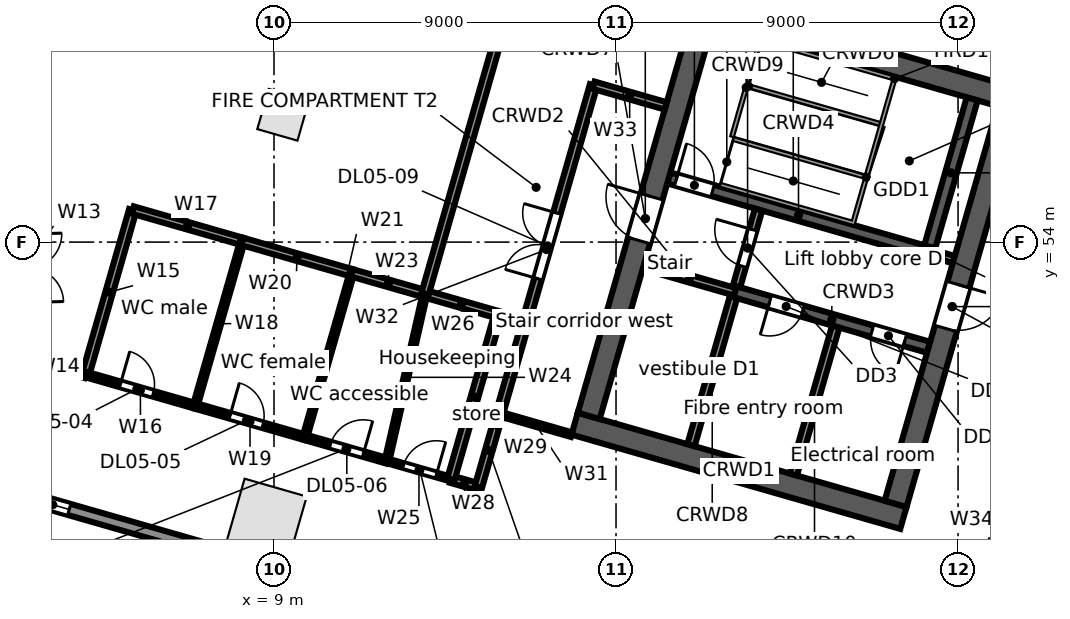
"""IFC4 building model, lengths in metres.
Left out: names, types, materials, properties, quantities, classifications, styles, units other than length and angle.
Written with IfcOpenShell. Run it as: python <this file> out.ifc"""

import sys

from ifc_helpers import new_model, si_unit, direction, frame, frame_2d, origin, origin_2d, place, context, subcontext, project, spatial, rectangle, extrude, element, fill, save


model = new_model("IFC4")
c1 = context("Model", 3, precision=1e-05, world=origin(), true_north=direction((0.0, 1.0)))
c2 = subcontext(c1, "Body", "Model", "MODEL_VIEW")
j1 = project(units=[si_unit("LENGTHUNIT", "METRE"), si_unit("PLANEANGLEUNIT", "RADIAN")], contexts=[c1])
p1 = place(None, origin())
s1 = spatial("IfcSite", under=j1, at=p1, CompositionType="ELEMENT")
p2 = place(p1, origin())
s2 = spatial("IfcBuilding", under=s1, at=p2, CompositionType="ELEMENT")
p3 = place(p2, frame((0.0, 0.0, 36.5)))
s3 = spatial("IfcBuildingStorey", under=s2, at=p3, CompositionType="ELEMENT", Elevation=36.5)
p4 = place(p3, frame((8.81, 46.722, 0.0), z_axis=(0.0, 0.0, 1.0), x_axis=(0.961261695938, -0.275637355817, 0.0)))
e1 = element("IfcColumn", 1, at=p4, inside=s3, PredefinedType="COLUMN", context=c2, shape_type="SweptSolid", body=[
    extrude(rectangle(XDim=1.7, YDim=1.7, at=origin_2d()), origin(), (0.0, 0.0, 1.0), 5.0),
])
p5 = place(p3, frame((9.241, 57.35, 0.0), z_axis=(0.0, 0.0, 1.0), x_axis=(0.961261695938, -0.275637355817, 0.0)))
e2 = element("IfcColumn", 2, at=p5, inside=s3, PredefinedType="COLUMN", context=c2, shape_type="SweptSolid", body=[
    extrude(rectangle(XDim=1.1, YDim=1.1, at=origin_2d()), origin(), (0.0, 0.0, 1.0), 5.0),
])
p6 = place(p3, frame((25.398, 40.717, 0.0), z_axis=(0.0, 0.0, 1.0), x_axis=(-0.961262423262, 0.275634819324, 0.0)))
e3 = element("IfcWall", 3, at=p6, inside=s3, PredefinedType="STANDARD", context=c2, shape_type="SweptSolid", body=[
    extrude(rectangle(XDim=26.359, YDim=0.3, at=frame_2d((13.179, 0.0))), origin(), (0.0, 0.0, 1.0), 4.68),
])
p7 = place(p6, frame((22.664, 0.0, 0.6)))
e4 = element("IfcOpeningElement", 4, at=p7, cuts=e3, PredefinedType="OPENING", context=c2, shape_type="SweptSolid", body=[
    extrude(rectangle(XDim=0.9, YDim=3.2, at=frame_2d((0.45, 1.6))), frame((0.0, 0.16, 0.0), z_axis=(0.0, -1.0, 0.0), x_axis=(1.0, 0.0, 0.0)), (0.0, 0.0, 1.0), 0.32),
])
p8 = place(p6, frame((13.844, 0.0, 0.6)))
e5 = element("IfcOpeningElement", 5, at=p8, cuts=e3, PredefinedType="OPENING", context=c2, shape_type="SweptSolid", body=[
    extrude(rectangle(XDim=0.9, YDim=3.2, at=frame_2d((0.45, 1.6))), frame((0.0, 0.16, 0.0), z_axis=(0.0, -1.0, 0.0), x_axis=(1.0, 0.0, 0.0)), (0.0, 0.0, 1.0), 0.32),
])
p9 = place(p6, frame((5.023, 0.0, 0.6)))
e6 = element("IfcOpeningElement", 6, at=p9, cuts=e3, PredefinedType="OPENING", context=c2, shape_type="SweptSolid", body=[
    extrude(rectangle(XDim=0.9, YDim=3.2, at=frame_2d((0.45, 1.6))), frame((0.0, 0.16, 0.0), z_axis=(0.0, -1.0, 0.0), x_axis=(1.0, 0.0, 0.0)), (0.0, 0.0, 1.0), 0.32),
])
p10 = place(p3, frame((16.911, 49.221, 0.0), z_axis=(0.0, 0.0, 1.0), x_axis=(0.96126248289, -0.275634611374, 0.0)))
e7 = element("IfcWall", 7, at=p10, inside=s3, PredefinedType="SOLIDWALL", context=c2, shape_type="SweptSolid", body=[
    extrude(rectangle(XDim=9.0, YDim=0.6, at=frame_2d((4.5, 0.0))), origin(), (0.0, 0.0, 1.0), 4.68),
])
p11 = place(p3, frame((18.728, 53.382, 0.0), z_axis=(0.0, 0.0, 1.0), x_axis=(0.961247070632, -0.275688355216, 0.0)))
e8 = element("IfcWall", 8, at=p11, inside=s3, PredefinedType="SOLIDWALL", context=c2, shape_type="SweptSolid", body=[
    extrude(rectangle(XDim=2.5, YDim=0.2, at=frame_2d((1.25, 0.0))), origin(), (0.0, 0.0, 1.0), 4.68),
])
p12 = place(p3, frame((21.131, 52.692, 0.0), z_axis=(0.0, 0.0, 1.0), x_axis=(0.961271492568, -0.275603188616, 0.0)))
e9 = element("IfcWall", 9, at=p12, inside=s3, PredefinedType="SOLIDWALL", context=c2, shape_type="SweptSolid", body=[
    extrude(rectangle(XDim=5.3, YDim=0.3, at=frame_2d((2.65, 0.0))), origin(), (0.0, 0.0, 1.0), 4.68),
])
p13 = place(p12, frame((0.95, 0.0, 0.0)))
e10 = element("IfcOpeningElement", 10, at=p13, cuts=e9, PredefinedType="OPENING", context=c2, shape_type="SweptSolid", body=[
    extrude(rectangle(XDim=0.9, YDim=2.1, at=frame_2d((0.45, 1.05))), frame((0.0, 0.16, 0.0), z_axis=(0.0, -1.0, 0.0), x_axis=(1.0, 0.0, 0.0)), (0.0, 0.0, 1.0), 0.32),
])
p14 = place(p12, frame((3.75, 0.0, 0.0)))
e11 = element("IfcOpeningElement", 11, at=p14, cuts=e9, PredefinedType="OPENING", context=c2, shape_type="SweptSolid", body=[
    extrude(rectangle(XDim=0.9, YDim=2.1, at=frame_2d((0.45, 1.05))), frame((0.0, 0.16, 0.0), z_axis=(0.0, -1.0, 0.0), x_axis=(1.0, 0.0, 0.0)), (0.0, 0.0, 1.0), 0.32),
])
p15 = place(p3, frame((19.389, 55.689, 0.0), z_axis=(0.0, 0.0, 1.0), x_axis=(0.961261397636, -0.275638396117, 0.0)))
e12 = element("IfcWall", 12, at=p15, inside=s3, PredefinedType="SOLIDWALL", context=c2, shape_type="SweptSolid", body=[
    extrude(rectangle(XDim=7.1, YDim=0.3, at=frame_2d((3.55, 0.0))), origin(), (0.0, 0.0, 1.0), 4.68),
])
p16 = place(p15, frame((0.2, 0.0, 0.0)))
e13 = element("IfcOpeningElement", 13, at=p16, cuts=e12, PredefinedType="OPENING", context=c2, shape_type="SweptSolid", body=[
    extrude(rectangle(XDim=1.0, YDim=2.1, at=frame_2d((0.5, 1.05))), frame((0.0, 0.16, 0.0), z_axis=(0.0, -1.0, 0.0), x_axis=(1.0, 0.0, 0.0)), (0.0, 0.0, 1.0), 0.32),
])
p17 = place(p3, frame((26.214, 53.732, 0.0), z_axis=(0.0, 0.0, 1.0), x_axis=(0.96122076476, -0.27578005982, 0.0)))
e14 = element("IfcWall", 14, at=p17, inside=s3, PredefinedType="SOLIDWALL", context=c2, shape_type="SweptSolid", body=[
    extrude(rectangle(XDim=0.7, YDim=0.2, at=frame_2d((0.35, 0.0))), origin(), (0.0, 0.0, 1.0), 4.68),
])
p18 = place(p3, frame((20.053, 60.18, 0.0), z_axis=(0.0, 0.0, 1.0), x_axis=(0.96126248289, -0.275634611374, 0.0)))
e15 = element("IfcWall", 15, at=p18, inside=s3, PredefinedType="SOLIDWALL", context=c2, shape_type="SweptSolid", body=[
    extrude(rectangle(XDim=9.0, YDim=0.6, at=frame_2d((4.5, 0.0))), origin(), (0.0, 0.0, 1.0), 4.68),
])
p19 = place(p3, frame((17.282, 49.427, 0.0), z_axis=(0.0, 0.0, 1.0), x_axis=(0.275631631629, 0.961263337304, 0.0)))
e16 = element("IfcWall", 16, at=p19, inside=s3, PredefinedType="SOLIDWALL", context=c2, shape_type="SweptSolid", body=[
    extrude(rectangle(XDim=10.8, YDim=0.6, at=frame_2d((5.4, 0.0))), origin(), (0.0, 0.0, 1.0), 4.68),
])
p20 = place(p19, frame((4.8, 0.0, 0.0)))
e17 = element("IfcOpeningElement", 17, at=p20, cuts=e16, PredefinedType="OPENING", context=c2, shape_type="SweptSolid", body=[
    extrude(rectangle(XDim=1.2, YDim=2.1, at=frame_2d((0.6, 1.05))), frame((0.0, 0.31, 0.0), z_axis=(0.0, -1.0, 0.0), x_axis=(1.0, 0.0, 0.0)), (0.0, 0.0, 1.0), 0.62),
])
p21 = place(p3, frame((19.973, 48.655, 0.0), z_axis=(0.0, 0.0, 1.0), x_axis=(0.275668441653, 0.961252781674, 0.0)))
e18 = element("IfcWall", 18, at=p21, inside=s3, PredefinedType="SOLIDWALL", context=c2, shape_type="SweptSolid", body=[
    extrude(rectangle(XDim=4.05, YDim=0.2, at=frame_2d((2.025, 0.0))), origin(), (0.0, 0.0, 1.0), 4.68),
])
p22 = place(p3, frame((21.172, 52.837, 0.0), z_axis=(0.0, 0.0, 1.0), x_axis=(0.275657676022, 0.961255868981, 0.0)))
e19 = element("IfcWall", 19, at=p22, inside=s3, PredefinedType="PARTITIONING", context=c2, shape_type="SweptSolid", body=[
    extrude(rectangle(XDim=2.1, YDim=0.2, at=frame_2d((1.05, 0.0))), origin(), (0.0, 0.0, 1.0), 4.68),
])
p23 = place(p22, frame((0.55, 0.0, 0.0)))
e20 = element("IfcOpeningElement", 20, at=p23, cuts=e19, PredefinedType="OPENING", context=c2, shape_type="SweptSolid", body=[
    extrude(rectangle(XDim=1.0, YDim=2.1, at=frame_2d((0.5, 1.05))), frame((0.0, 0.11, 0.0), z_axis=(0.0, -1.0, 0.0), x_axis=(1.0, 0.0, 0.0)), (0.0, 0.0, 1.0), 0.22),
])
p24 = place(p3, frame((22.665, 47.883, 0.0), z_axis=(0.0, 0.0, 1.0), x_axis=(0.275596769212, 0.961273333033, 0.0)))
e21 = element("IfcWall", 21, at=p24, inside=s3, PredefinedType="PARTITIONING", context=c2, shape_type="SweptSolid", body=[
    extrude(rectangle(XDim=4.05, YDim=0.2, at=frame_2d((2.025, 0.0))), origin(), (0.0, 0.0, 1.0), 4.68),
])
p25 = place(p3, frame((26.256, 53.876, 0.0), z_axis=(0.0, 0.0, 1.0), x_axis=(0.275612739511, 0.961268754209, 0.0)))
e22 = element("IfcWall", 22, at=p25, inside=s3, PredefinedType="SOLIDWALL", context=c2, shape_type="SweptSolid", body=[
    extrude(rectangle(XDim=4.05, YDim=0.3, at=frame_2d((2.025, 0.0))), origin(), (0.0, 0.0, 1.0), 4.68),
])
p26 = place(p3, frame((25.356, 47.112, 0.0), z_axis=(0.0, 0.0, 1.0), x_axis=(0.275631631629, 0.961263337304, 0.0)))
e23 = element("IfcWall", 23, at=p26, inside=s3, PredefinedType="SOLIDWALL", context=c2, shape_type="SweptSolid", body=[
    extrude(rectangle(XDim=10.8, YDim=0.6, at=frame_2d((5.4, 0.0))), origin(), (0.0, 0.0, 1.0), 4.68),
])
p27 = place(p26, frame((4.8, 0.0, 0.0)))
e24 = element("IfcOpeningElement", 24, at=p27, cuts=e23, PredefinedType="OPENING", context=c2, shape_type="SweptSolid", body=[
    extrude(rectangle(XDim=1.2, YDim=2.1, at=frame_2d((0.6, 1.05))), frame((0.0, 0.31, 0.0), z_axis=(0.0, -1.0, 0.0), x_axis=(1.0, 0.0, 0.0)), (0.0, 0.0, 1.0), 0.62),
])
p28 = place(p3, frame((2.601, 50.932, 0.0), z_axis=(0.0, 0.0, 1.0), x_axis=(0.961197773994, -0.27586018065, 0.0)))
e25 = element("IfcWall", 25, at=p28, inside=s3, PredefinedType="PARTITIONING", context=c2, shape_type="SweptSolid", body=[
    extrude(rectangle(XDim=1.5, YDim=0.2, at=frame_2d((0.75, 0.0))), origin(), (0.0, 0.0, 1.0), 4.68),
])
p29 = place(p3, frame((4.043, 50.518, 0.0), z_axis=(0.0, 0.0, 1.0), x_axis=(0.275745553681, 0.96123066411, 0.0)))
e26 = element("IfcWall", 26, at=p29, inside=s3, PredefinedType="PARTITIONING", context=c2, shape_type="SweptSolid", body=[
    extrude(rectangle(XDim=4.5, YDim=0.2, at=frame_2d((2.25, 0.0))), origin(), (0.0, 0.0, 1.0), 4.68),
])
p30 = place(p3, frame((4.043, 50.518, 0.0), z_axis=(0.0, 0.0, 1.0), x_axis=(0.961247103494, -0.275688240636, 0.0)))
e27 = element("IfcWall", 27, at=p30, inside=s3, PredefinedType="PARTITIONING", context=c2, shape_type="SweptSolid", body=[
    extrude(rectangle(XDim=3.0, YDim=0.15, at=frame_2d((1.5, 0.0))), origin(), (0.0, 0.0, 1.0), 4.68),
])
p31 = place(p30, frame((0.95, 0.0, 0.0)))
e28 = element("IfcOpeningElement", 28, at=p31, cuts=e27, PredefinedType="OPENING", context=c2, shape_type="SweptSolid", body=[
    extrude(rectangle(XDim=0.9, YDim=2.1, at=frame_2d((0.45, 1.05))), frame((0.0, 0.085, 0.0), z_axis=(0.0, -1.0, 0.0), x_axis=(1.0, 0.0, 0.0)), (0.0, 0.0, 1.0), 0.17),
])
p32 = place(p3, frame((5.284, 54.844, 0.0), z_axis=(0.0, 0.0, 1.0), x_axis=(0.961243927922, -0.275699312717, 0.0)))
e29 = element("IfcWall", 29, at=p32, inside=s3, PredefinedType="PARTITIONING", context=c2, shape_type="SweptSolid", body=[
    extrude(rectangle(XDim=2.999, YDim=0.2, at=frame_2d((1.5, 0.0))), origin(), (0.0, 0.0, 1.0), 4.68),
])
p33 = place(p3, frame((6.927, 49.691, 0.0), z_axis=(0.0, 0.0, 1.0), x_axis=(0.275530671241, 0.961292280841, 0.0)))
e30 = element("IfcWall", 30, at=p33, inside=s3, PredefinedType="PARTITIONING", context=c2, shape_type="SweptSolid", body=[
    extrude(rectangle(XDim=4.5, YDim=0.125, at=frame_2d((2.25, 0.0))), origin(), (0.0, 0.0, 1.0), 4.68),
])
p34 = place(p3, frame((6.927, 49.691, 0.0), z_axis=(0.0, 0.0, 1.0), x_axis=(0.961268664977, -0.27561305073, 0.0)))
e31 = element("IfcWall", 31, at=p34, inside=s3, PredefinedType="PARTITIONING", context=c2, shape_type="SweptSolid", body=[
    extrude(rectangle(XDim=3.0, YDim=0.15, at=frame_2d((1.5, 0.0))), origin(), (0.0, 0.0, 1.0), 3.742),
])
p35 = place(p34, frame((0.95, 0.0, 0.0)))
e32 = element("IfcOpeningElement", 32, at=p35, cuts=e31, PredefinedType="OPENING", context=c2, shape_type="SweptSolid", body=[
    extrude(rectangle(XDim=0.9, YDim=2.1, at=frame_2d((0.45, 1.05))), frame((0.0, 0.085, 0.0), z_axis=(0.0, -1.0, 0.0), x_axis=(1.0, 0.0, 0.0)), (0.0, 0.0, 1.0), 0.17),
])
p36 = place(p3, frame((8.167, 54.017, 0.0), z_axis=(0.0, 0.0, 1.0), x_axis=(0.961247103494, -0.275688240636, 0.0)))
e33 = element("IfcWall", 33, at=p36, inside=s3, PredefinedType="PARTITIONING", context=c2, shape_type="SweptSolid", body=[
    extrude(rectangle(XDim=3.0, YDim=0.2, at=frame_2d((1.5, 0.0))), origin(), (0.0, 0.0, 1.0), 3.742),
])
p37 = place(p3, frame((9.811, 48.864, 0.0), z_axis=(0.0, 0.0, 1.0), x_axis=(0.275545040649, 0.96128816209, 0.0)))
e34 = element("IfcWall", 34, at=p37, inside=s3, PredefinedType="PARTITIONING", context=c2, shape_type="SweptSolid", body=[
    extrude(rectangle(XDim=4.5, YDim=0.125, at=frame_2d((2.25, 0.0))), origin(), (0.0, 0.0, 1.0), 4.68),
])
p38 = place(p3, frame((9.811, 48.864, 0.0), z_axis=(0.0, 0.0, 1.0), x_axis=(0.961236680145, -0.275724581318, 0.0)))
e35 = element("IfcWall", 35, at=p38, inside=s3, PredefinedType="PARTITIONING", context=c2, shape_type="SweptSolid", body=[
    extrude(rectangle(XDim=2.249, YDim=0.15, at=frame_2d((1.125, 0.0))), origin(), (0.0, 0.0, 1.0), 4.68),
])
p39 = place(p38, frame((0.7, 0.0, 0.0)))
e36 = element("IfcOpeningElement", 36, at=p39, cuts=e35, PredefinedType="OPENING", context=c2, shape_type="SweptSolid", body=[
    extrude(rectangle(XDim=0.9, YDim=2.1, at=frame_2d((0.45, 1.05))), frame((0.0, 0.085, 0.0), z_axis=(0.0, -1.0, 0.0), x_axis=(1.0, 0.0, 0.0)), (0.0, 0.0, 1.0), 0.17),
])
p40 = place(p3, frame((11.051, 53.19, 0.0), z_axis=(0.0, 0.0, 1.0), x_axis=(0.961316434736, -0.275446387355, 0.0)))
e37 = element("IfcWall", 37, at=p40, inside=s3, PredefinedType="PARTITIONING", context=c2, shape_type="SweptSolid", body=[
    extrude(rectangle(XDim=2.0, YDim=0.2, at=frame_2d((1.0, 0.0))), origin(), (0.0, 0.0, 1.0), 4.68),
])
p41 = place(p3, frame((11.973, 48.244, 0.0), z_axis=(0.0, 0.0, 1.0), x_axis=(0.222117362571, 0.975019936845, 0.0)))
e38 = element("IfcWall", 38, at=p41, inside=s3, PredefinedType="PARTITIONING", context=c2, shape_type="SweptSolid", body=[
    extrude(rectangle(XDim=4.508, YDim=0.125, at=frame_2d((2.254, 0.0))), origin(), (0.0, 0.0, 1.0), 4.68),
])
p42 = place(p3, frame((11.973, 48.244, 0.0), z_axis=(0.0, 0.0, 1.0), x_axis=(0.96136592135, -0.275273618907, 0.0)))
e39 = element("IfcWall", 39, at=p42, inside=s3, PredefinedType="PARTITIONING", context=c2, shape_type="SweptSolid", body=[
    extrude(rectangle(XDim=1.751, YDim=0.125, at=frame_2d((0.875, 0.0))), origin(), (0.0, 0.0, 1.0), 4.68),
])
p43 = place(p42, frame((0.45, 0.0, 0.0)))
e40 = element("IfcOpeningElement", 40, at=p43, cuts=e39, PredefinedType="OPENING", context=c2, shape_type="SweptSolid", body=[
    extrude(rectangle(XDim=0.9, YDim=2.1, at=frame_2d((0.45, 1.05))), frame((0.0, 0.073, 0.0), z_axis=(0.0, -1.0, 0.0), x_axis=(1.0, 0.0, 0.0)), (0.0, 0.0, 1.0), 0.145),
])
p44 = place(p3, frame((12.974, 52.639, 0.0), z_axis=(0.0, 0.0, 1.0), x_axis=(0.961270097305, -0.275608055084, 0.0)))
e41 = element("IfcWall", 41, at=p44, inside=s3, PredefinedType="PARTITIONING", context=c2, shape_type="SweptSolid", body=[
    extrude(rectangle(XDim=1.999, YDim=0.2, at=frame_2d((1.0, 0.0))), origin(), (0.0, 0.0, 1.0), 4.68),
])
p45 = place(p3, frame((12.974, 52.639, 0.0), z_axis=(0.0, 0.0, 1.0), x_axis=(0.275299463768, 0.961358520662, 0.0)))
e42 = element("IfcWall", 42, at=p45, inside=s3, PredefinedType="PARTITIONING", context=c2, shape_type="SweptSolid", body=[
    extrude(rectangle(XDim=14.885, YDim=0.2, at=frame_2d((7.443, 0.0))), origin(), (0.0, 0.0, 1.0), 3.742),
])
p46 = place(p3, frame((13.656, 47.762, 0.0), z_axis=(0.0, 0.0, 1.0), x_axis=(0.961154610169, -0.276010534854, 0.0)))
e43 = element("IfcWall", 43, at=p46, inside=s3, PredefinedType="PARTITIONING", context=c2, shape_type="SweptSolid", body=[
    extrude(rectangle(XDim=0.75, YDim=0.2, at=frame_2d((0.375, 0.0))), origin(), (0.0, 0.0, 1.0), 4.68),
])
p47 = place(p3, frame((13.656, 47.762, 0.0), z_axis=(0.0, 0.0, 1.0), x_axis=(0.275545040649, 0.96128816209, 0.0)))
e44 = element("IfcWall", 44, at=p47, inside=s3, PredefinedType="PARTITIONING", context=c2, shape_type="SweptSolid", body=[
    extrude(rectangle(XDim=4.5, YDim=0.2, at=frame_2d((2.25, 0.0))), origin(), (0.0, 0.0, 1.0), 4.68),
])
p48 = place(p3, frame((14.377, 47.555, 0.0), z_axis=(0.0, 0.0, 1.0), x_axis=(0.275446387355, 0.961316434736, 0.0)))
e45 = element("IfcWall", 45, at=p48, inside=s3, PredefinedType="PARTITIONING", context=c2, shape_type="SweptSolid", body=[
    extrude(rectangle(XDim=2.0, YDim=0.2, at=frame_2d((1.0, 0.0))), origin(), (0.0, 0.0, 1.0), 4.68),
])
p49 = place(p3, frame((14.928, 49.478, 0.0), z_axis=(0.0, 0.0, 1.0), x_axis=(0.961243778232, -0.27569983462, 0.0)))
e46 = element("IfcWall", 46, at=p49, inside=s3, PredefinedType="PARTITIONING", context=c2, shape_type="SweptSolid", body=[
    extrude(rectangle(XDim=1.977, YDim=0.125, at=frame_2d((0.988, 0.0))), origin(), (0.0, 0.0, 1.0), 4.68),
])
p50 = place(p3, frame((14.928, 49.478, 0.0), z_axis=(0.0, 0.0, 1.0), x_axis=(0.275674053528, 0.961251172281, 0.0)))
e47 = element("IfcWall", 47, at=p50, inside=s3, PredefinedType="PARTITIONING", context=c2, shape_type="SweptSolid", body=[
    extrude(rectangle(XDim=9.0, YDim=0.2, at=frame_2d((4.5, 0.0))), origin(), (0.0, 0.0, 1.0), 3.742),
])
p51 = place(p50, frame((3.7, 0.0, 0.0)))
e48 = element("IfcOpeningElement", 48, at=p51, cuts=e47, PredefinedType="OPENING", context=c2, shape_type="SweptSolid", body=[
    extrude(rectangle(XDim=1.8, YDim=2.1, at=frame_2d((0.9, 1.05))), frame((0.0, 0.11, 0.0), z_axis=(0.0, -1.0, 0.0), x_axis=(1.0, 0.0, 0.0)), (0.0, 0.0, 1.0), 0.22),
])
p52 = place(p3, frame((17.409, 58.129, 0.0), z_axis=(0.0, 0.0, 1.0), x_axis=(0.961253165474, -0.275667103345, 0.0)))
e49 = element("IfcWall", 49, at=p52, inside=s3, PredefinedType="PARTITIONING", context=c2, shape_type="SweptSolid", body=[
    extrude(rectangle(XDim=1.977, YDim=0.2, at=frame_2d((0.988, 0.0))), origin(), (0.0, 0.0, 1.0), 4.68),
])
p53 = place(p3, frame((26.456, 42.338, 0.0), z_axis=(0.0, 0.0, 1.0), x_axis=(0.52980027265, 0.848122438743, 0.0)))
e50 = element("IfcWall", 50, at=p53, inside=s3, PredefinedType="PARTITIONING", context=c2, shape_type="SweptSolid", body=[
    extrude(rectangle(XDim=6.076, YDim=0.25, at=frame_2d((3.038, 0.0))), origin(), (0.0, 0.0, 1.0), 4.68),
])
p54 = place(p53, frame((2.2, 0.0, 0.0)))
e51 = element("IfcOpeningElement", 51, at=p54, cuts=e50, PredefinedType="OPENING", context=c2, shape_type="SweptSolid", body=[
    extrude(rectangle(XDim=1.8, YDim=2.1, at=frame_2d((0.9, 1.05))), frame((0.0, 0.135, 0.0), z_axis=(0.0, -1.0, 0.0), x_axis=(1.0, 0.0, 0.0)), (0.0, 0.0, 1.0), 0.27),
])
p55 = place(p7, origin())
e52 = element("IfcWindow", 52, at=p55, inside=s3, PartitioningType="SINGLE_PANEL", PredefinedType="WINDOW", context=c2, shape_type="SweptSolid", body=[
    extrude(rectangle(XDim=0.9, YDim=3.2, at=frame_2d((0.45, 1.6))), frame((0.0, 0.03, 0.0), z_axis=(0.0, -1.0, 0.0), x_axis=(1.0, 0.0, 0.0)), (0.0, 0.0, 1.0), 0.06),
])
fill(e4, e52)
p56 = place(p16, origin())
e53 = element("IfcDoor", 53, at=p56, inside=s3, OperationType="SINGLE_SWING_LEFT", PredefinedType="DOOR", context=c2, shape_type="SweptSolid", body=[
    extrude(rectangle(XDim=1.0, YDim=2.1, at=frame_2d((0.5, 1.05))), frame((0.0, 0.025, 0.0), z_axis=(0.0, -1.0, 0.0), x_axis=(1.0, 0.0, 0.0)), (0.0, 0.0, 1.0), 0.05),
])
fill(e13, e53)
p57 = place(p23, origin())
e54 = element("IfcDoor", 54, at=p57, inside=s3, OperationType="SINGLE_SWING_RIGHT", PredefinedType="DOOR", context=c2, shape_type="SweptSolid", body=[
    extrude(rectangle(XDim=1.0, YDim=2.1, at=frame_2d((0.5, 1.05))), frame((0.0, 0.025, 0.0), z_axis=(0.0, -1.0, 0.0), x_axis=(1.0, 0.0, 0.0)), (0.0, 0.0, 1.0), 0.05),
])
fill(e20, e54)
p58 = place(p20, origin())
e55 = element("IfcDoor", 55, at=p58, inside=s3, OperationType="SINGLE_SWING_RIGHT", PredefinedType="DOOR", context=c2, shape_type="SweptSolid", body=[
    extrude(rectangle(XDim=1.2, YDim=2.1, at=frame_2d((0.6, 1.05))), frame((0.0, 0.025, 0.0), z_axis=(0.0, -1.0, 0.0), x_axis=(1.0, 0.0, 0.0)), (0.0, 0.0, 1.0), 0.05),
])
fill(e17, e55)
p59 = place(p27, frame((1.2, 0.0, 0.0), z_axis=(0.0, 0.0, 1.0), x_axis=(-1.0, 0.0, 0.0)))
e56 = element("IfcDoor", 56, at=p59, inside=s3, OperationType="SINGLE_SWING_LEFT", PredefinedType="DOOR", context=c2, shape_type="SweptSolid", body=[
    extrude(rectangle(XDim=1.2, YDim=2.1, at=frame_2d((0.6, 1.05))), frame((0.0, 0.025, 0.0), z_axis=(0.0, -1.0, 0.0), x_axis=(1.0, 0.0, 0.0)), (0.0, 0.0, 1.0), 0.05),
])
fill(e24, e56)
p60 = place(p13, frame((0.9, 0.0, 0.0), z_axis=(0.0, 0.0, 1.0), x_axis=(-1.0, 0.0, 0.0)))
e57 = element("IfcDoor", 57, at=p60, inside=s3, OperationType="SINGLE_SWING_RIGHT", PredefinedType="DOOR", context=c2, shape_type="SweptSolid", body=[
    extrude(rectangle(XDim=0.9, YDim=2.1, at=frame_2d((0.45, 1.05))), frame((0.0, 0.025, 0.0), z_axis=(0.0, -1.0, 0.0), x_axis=(1.0, 0.0, 0.0)), (0.0, 0.0, 1.0), 0.05),
])
fill(e10, e57)
p61 = place(p14, frame((0.9, 0.0, 0.0), z_axis=(0.0, 0.0, 1.0), x_axis=(-1.0, 0.0, 0.0)))
e58 = element("IfcDoor", 58, at=p61, inside=s3, OperationType="SINGLE_SWING_LEFT", PredefinedType="DOOR", context=c2, shape_type="SweptSolid", body=[
    extrude(rectangle(XDim=0.9, YDim=2.1, at=frame_2d((0.45, 1.05))), frame((0.0, 0.025, 0.0), z_axis=(0.0, -1.0, 0.0), x_axis=(1.0, 0.0, 0.0)), (0.0, 0.0, 1.0), 0.05),
])
fill(e11, e58)
p62 = place(p31, origin())
e59 = element("IfcDoor", 59, at=p62, inside=s3, OperationType="SINGLE_SWING_LEFT", PredefinedType="DOOR", context=c2, shape_type="SweptSolid", body=[
    extrude(rectangle(XDim=0.9, YDim=2.1, at=frame_2d((0.45, 1.05))), frame((0.0, 0.025, 0.0), z_axis=(0.0, -1.0, 0.0), x_axis=(1.0, 0.0, 0.0)), (0.0, 0.0, 1.0), 0.05),
])
fill(e28, e59)
p63 = place(p35, origin())
e60 = element("IfcDoor", 60, at=p63, inside=s3, OperationType="SINGLE_SWING_LEFT", PredefinedType="DOOR", context=c2, shape_type="SweptSolid", body=[
    extrude(rectangle(XDim=0.9, YDim=2.1, at=frame_2d((0.45, 1.05))), frame((0.0, 0.025, 0.0), z_axis=(0.0, -1.0, 0.0), x_axis=(1.0, 0.0, 0.0)), (0.0, 0.0, 1.0), 0.05),
])
fill(e32, e60)
p64 = place(p39, origin())
e61 = element("IfcDoor", 61, at=p64, inside=s3, OperationType="SINGLE_SWING_RIGHT", PredefinedType="DOOR", context=c2, shape_type="SweptSolid", body=[
    extrude(rectangle(XDim=0.9, YDim=2.1, at=frame_2d((0.45, 1.05))), frame((0.0, 0.025, 0.0), z_axis=(0.0, -1.0, 0.0), x_axis=(1.0, 0.0, 0.0)), (0.0, 0.0, 1.0), 0.05),
])
fill(e36, e61)
p65 = place(p43, origin())
e62 = element("IfcDoor", 62, at=p65, inside=s3, OperationType="SINGLE_SWING_RIGHT", PredefinedType="DOOR", context=c2, shape_type="SweptSolid", body=[
    extrude(rectangle(XDim=0.9, YDim=2.1, at=frame_2d((0.45, 1.05))), frame((0.0, 0.025, 0.0), z_axis=(0.0, -1.0, 0.0), x_axis=(1.0, 0.0, 0.0)), (0.0, 0.0, 1.0), 0.05),
])
fill(e40, e62)
p66 = place(p51, origin())
e63 = element("IfcDoor", 63, at=p66, inside=s3, OperationType="DOUBLE_DOOR_SINGLE_SWING", PredefinedType="DOOR", context=c2, shape_type="SweptSolid", body=[
    extrude(rectangle(XDim=1.8, YDim=2.1, at=frame_2d((0.9, 1.05))), frame((0.0, 0.025, 0.0), z_axis=(0.0, -1.0, 0.0), x_axis=(1.0, 0.0, 0.0)), (0.0, 0.0, 1.0), 0.05),
])
fill(e48, e63)
save(model, sys.argv[1])
